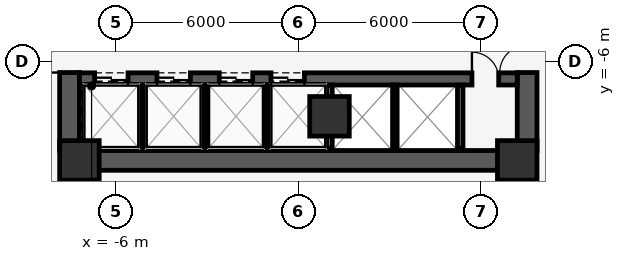
"""IFC4 building model, lengths in metres.
Left out: names, types, materials, properties, quantities, classifications, styles, units other than length and angle.
Written with IfcOpenShell. Run it as: python <this file> out.ifc"""

import sys

from ifc_helpers import new_model, si_unit, direction, frame, frame_2d, origin, origin_2d, place, context, subcontext, project, spatial, rectangle, extrude, element, fill, save


model = new_model("IFC4")
c1 = context("Model", 3, precision=1e-05, world=origin(), true_north=direction((0.0, 1.0)))
c2 = subcontext(c1, "Body", "Model", "MODEL_VIEW")
j1 = project(units=[si_unit("LENGTHUNIT", "METRE"), si_unit("PLANEANGLEUNIT", "RADIAN")], contexts=[c1])
p1 = place(None, origin())
s1 = spatial("IfcSite", under=j1, at=p1, CompositionType="ELEMENT")
p2 = place(p1, origin())
s2 = spatial("IfcBuilding", under=s1, at=p2, CompositionType="ELEMENT")
p3 = place(p2, frame((0.0, 0.0, 152.7)))
s3 = spatial("IfcBuildingStorey", under=s2, at=p3, CompositionType="ELEMENT", Elevation=152.7)
p4 = place(p3, frame((-7.525, -8.925, 0.0), z_axis=(0.0, 0.0, 1.0), x_axis=(0.0, 1.0, 0.0)))
e1 = element("IfcWall", 1, at=p4, inside=s3, PredefinedType="SHEAR", context=c2, shape_type="SweptSolid", body=[
    extrude(rectangle(XDim=9.025, YDim=0.65, at=frame_2d((4.513, 0.0))), origin(), (0.0, 0.0, 1.0), 3.85),
])
p5 = place(p4, frame((2.565, 0.0, 0.0)))
e2 = element("IfcOpeningElement", 2, at=p5, cuts=e1, PredefinedType="OPENING", context=c2, shape_type="SweptSolid", body=[
    extrude(rectangle(XDim=1.8, YDim=2.2, at=frame_2d((0.9, 1.1))), frame((0.0, 0.335, 0.0), z_axis=(0.0, -1.0, 0.0), x_axis=(1.0, 0.0, 0.0)), (0.0, 0.0, 1.0), 0.67),
])
p6 = place(p4, frame((7.475, 0.0, 0.0)))
e3 = element("IfcOpeningElement", 3, at=p6, cuts=e1, PredefinedType="OPENING", context=c2, shape_type="SweptSolid", body=[
    extrude(rectangle(XDim=1.2, YDim=2.15, at=frame_2d((0.6, 1.075))), frame((0.0, 0.335, 0.0), z_axis=(0.0, -1.0, 0.0), x_axis=(1.0, 0.0, 0.0)), (0.0, 0.0, 1.0), 0.67),
])
p7 = place(p3, frame((7.525, -8.925, 0.0), z_axis=(0.0, 0.0, 1.0), x_axis=(0.0, 1.0, 0.0)))
e4 = element("IfcWall", 4, at=p7, inside=s3, PredefinedType="SHEAR", context=c2, shape_type="SweptSolid", body=[
    extrude(rectangle(XDim=9.025, YDim=0.65, at=frame_2d((4.513, 0.0))), origin(), (0.0, 0.0, 1.0), 3.85),
])
p8 = place(p7, frame((2.565, 0.0, 0.0)))
e5 = element("IfcOpeningElement", 5, at=p8, cuts=e4, PredefinedType="OPENING", context=c2, shape_type="SweptSolid", body=[
    extrude(rectangle(XDim=1.8, YDim=2.2, at=frame_2d((0.9, 1.1))), frame((0.0, 0.335, 0.0), z_axis=(0.0, -1.0, 0.0), x_axis=(1.0, 0.0, 0.0)), (0.0, 0.0, 1.0), 0.67),
])
p9 = place(p7, frame((7.475, 0.0, 0.0)))
e6 = element("IfcOpeningElement", 6, at=p9, cuts=e4, PredefinedType="OPENING", context=c2, shape_type="SweptSolid", body=[
    extrude(rectangle(XDim=1.2, YDim=2.15, at=frame_2d((0.6, 1.075))), frame((0.0, 0.335, 0.0), z_axis=(0.0, -1.0, 0.0), x_axis=(1.0, 0.0, 0.0)), (0.0, 0.0, 1.0), 0.67),
])
p10 = place(p3, frame((-7.525, -9.25, 0.0), z_axis=(0.0, 0.0, 1.0), x_axis=(1.0, 0.0, 0.0)))
e7 = element("IfcWall", 7, at=p10, inside=s3, PredefinedType="SHEAR", context=c2, shape_type="SweptSolid", body=[
    extrude(rectangle(XDim=15.05, YDim=0.65, at=frame_2d((7.525, 0.0))), origin(), (0.0, 0.0, 1.0), 3.85),
])
p11 = place(p3, frame((-7.2, -6.57, 0.0), z_axis=(0.0, 0.0, 1.0), x_axis=(1.0, 0.0, 0.0)))
e8 = element("IfcWall", 8, at=p11, inside=s3, PredefinedType="SHEAR", context=c2, shape_type="SweptSolid", body=[
    extrude(rectangle(XDim=14.4, YDim=0.4, at=frame_2d((7.2, 0.0))), origin(), (0.0, 0.0, 1.0), 3.85),
])
p12 = place(p11, frame((0.5, 0.0, 0.0)))
e9 = element("IfcOpeningElement", 9, at=p12, cuts=e8, PredefinedType="OPENING", context=c2, shape_type="SweptSolid", body=[
    extrude(rectangle(XDim=1.1, YDim=2.2, at=frame_2d((0.55, 1.1))), frame((0.0, 0.21, 0.0), z_axis=(0.0, -1.0, 0.0), x_axis=(1.0, 0.0, 0.0)), (0.0, 0.0, 1.0), 0.42),
])
p13 = place(p11, frame((2.55, 0.0, 0.0)))
e10 = element("IfcOpeningElement", 10, at=p13, cuts=e8, PredefinedType="OPENING", context=c2, shape_type="SweptSolid", body=[
    extrude(rectangle(XDim=1.1, YDim=2.2, at=frame_2d((0.55, 1.1))), frame((0.0, 0.21, 0.0), z_axis=(0.0, -1.0, 0.0), x_axis=(1.0, 0.0, 0.0)), (0.0, 0.0, 1.0), 0.42),
])
p14 = place(p11, frame((4.6, 0.0, 0.0)))
e11 = element("IfcOpeningElement", 11, at=p14, cuts=e8, PredefinedType="OPENING", context=c2, shape_type="SweptSolid", body=[
    extrude(rectangle(XDim=1.1, YDim=2.2, at=frame_2d((0.55, 1.1))), frame((0.0, 0.21, 0.0), z_axis=(0.0, -1.0, 0.0), x_axis=(1.0, 0.0, 0.0)), (0.0, 0.0, 1.0), 0.42),
])
p15 = place(p11, frame((6.3, 0.0, 0.0)))
e12 = element("IfcOpeningElement", 12, at=p15, cuts=e8, PredefinedType="OPENING", context=c2, shape_type="SweptSolid", body=[
    extrude(rectangle(XDim=1.1, YDim=2.2, at=frame_2d((0.55, 1.1))), frame((0.0, 0.21, 0.0), z_axis=(0.0, -1.0, 0.0), x_axis=(1.0, 0.0, 0.0)), (0.0, 0.0, 1.0), 0.42),
])
p16 = place(p11, frame((12.91, 0.0, 0.0)))
e13 = element("IfcOpeningElement", 13, at=p16, cuts=e8, PredefinedType="OPENING", context=c2, shape_type="SweptSolid", body=[
    extrude(rectangle(XDim=0.88, YDim=2.15, at=frame_2d((0.44, 1.075))), frame((0.0, 0.21, 0.0), z_axis=(0.0, -1.0, 0.0), x_axis=(1.0, 0.0, 0.0)), (0.0, 0.0, 1.0), 0.42),
])
for number, where, z_axis, x_axis in (
    (14, (-7.2, -9.25, 0.0), (0.0, 0.0, 1.0), (1.0, 0.0, 0.0)),
    (15, (7.2, -9.25, 0.0), (0.0, 0.0, 1.0), (1.0, 0.0, 0.0)),
    (16, (1.025, -7.8, 0.0), (0.0, 0.0, 1.0), (1.0, 0.0, 0.0)),
):
    element("IfcColumn", number, at=place(p3, frame(where, z_axis=z_axis, x_axis=x_axis)), inside=s3, PredefinedType="COLUMN", context=c2, shape_type="SweptSolid", body=[
        extrude(rectangle(XDim=1.3, YDim=1.3, at=origin_2d()), origin(), (0.0, 0.0, 1.0), 4.1),
    ])
p17 = place(p3, frame((35.296, -9.873, 0.0), z_axis=(0.0, 0.0, 1.0), x_axis=(-0.933580612554, -0.35836746485, 0.0)))
e17 = element("IfcWall", 17, at=p17, inside=s3, PredefinedType="STANDARD", context=c2, shape_type="SweptSolid", body=[
    extrude(rectangle(XDim=58.828, YDim=0.3, at=frame_2d((29.414, 0.0))), origin(), (0.0, 0.0, 1.0), 3.85),
])
p18 = place(p17, frame((6.314, 0.0, 0.85)))
e18 = element("IfcOpeningElement", 18, at=p18, cuts=e17, PredefinedType="OPENING", context=c2, shape_type="SweptSolid", body=[
    extrude(rectangle(XDim=1.4, YDim=2.2, at=frame_2d((0.7, 1.1))), frame((0.0, 0.16, 0.0), z_axis=(0.0, -1.0, 0.0), x_axis=(1.0, 0.0, 0.0)), (0.0, 0.0, 1.0), 0.32),
])
p19 = place(p17, frame((11.914, 0.0, 0.85)))
e19 = element("IfcOpeningElement", 19, at=p19, cuts=e17, PredefinedType="OPENING", context=c2, shape_type="SweptSolid", body=[
    extrude(rectangle(XDim=1.4, YDim=2.2, at=frame_2d((0.7, 1.1))), frame((0.0, 0.16, 0.0), z_axis=(0.0, -1.0, 0.0), x_axis=(1.0, 0.0, 0.0)), (0.0, 0.0, 1.0), 0.32),
])
p20 = place(p17, frame((23.114, 0.0, 0.85)))
e20 = element("IfcOpeningElement", 20, at=p20, cuts=e17, PredefinedType="OPENING", context=c2, shape_type="SweptSolid", body=[
    extrude(rectangle(XDim=1.4, YDim=2.2, at=frame_2d((0.7, 1.1))), frame((0.0, 0.16, 0.0), z_axis=(0.0, -1.0, 0.0), x_axis=(1.0, 0.0, 0.0)), (0.0, 0.0, 1.0), 0.32),
])
p21 = place(p17, frame((28.714, 0.0, 0.85)))
e21 = element("IfcOpeningElement", 21, at=p21, cuts=e17, PredefinedType="OPENING", context=c2, shape_type="SweptSolid", body=[
    extrude(rectangle(XDim=1.4, YDim=2.2, at=frame_2d((0.7, 1.1))), frame((0.0, 0.16, 0.0), z_axis=(0.0, -1.0, 0.0), x_axis=(1.0, 0.0, 0.0)), (0.0, 0.0, 1.0), 0.32),
])
p22 = place(p17, frame((34.314, 0.0, 0.85)))
e22 = element("IfcOpeningElement", 22, at=p22, cuts=e17, PredefinedType="OPENING", context=c2, shape_type="SweptSolid", body=[
    extrude(rectangle(XDim=1.4, YDim=2.2, at=frame_2d((0.7, 1.1))), frame((0.0, 0.16, 0.0), z_axis=(0.0, -1.0, 0.0), x_axis=(1.0, 0.0, 0.0)), (0.0, 0.0, 1.0), 0.32),
])
p23 = place(p17, frame((45.514, 0.0, 0.85)))
e23 = element("IfcOpeningElement", 23, at=p23, cuts=e17, PredefinedType="OPENING", context=c2, shape_type="SweptSolid", body=[
    extrude(rectangle(XDim=1.4, YDim=2.2, at=frame_2d((0.7, 1.1))), frame((0.0, 0.16, 0.0), z_axis=(0.0, -1.0, 0.0), x_axis=(1.0, 0.0, 0.0)), (0.0, 0.0, 1.0), 0.32),
])
p24 = place(p17, frame((51.114, 0.0, 0.85)))
e24 = element("IfcOpeningElement", 24, at=p24, cuts=e17, PredefinedType="OPENING", context=c2, shape_type="SweptSolid", body=[
    extrude(rectangle(XDim=1.4, YDim=2.2, at=frame_2d((0.7, 1.1))), frame((0.0, 0.16, 0.0), z_axis=(0.0, -1.0, 0.0), x_axis=(1.0, 0.0, 0.0)), (0.0, 0.0, 1.0), 0.32),
])
for number, where, z_axis, x_axis in (
    (25, (-5.125, -8.85, 0.0), (0.0, 0.0, 1.0), (0.0, 1.0, 0.0)),
    (26, (-3.075, -8.85, 0.0), (0.0, 0.0, 1.0), (0.0, 1.0, 0.0)),
    (27, (-1.025, -8.85, 0.0), (0.0, 0.0, 1.0), (0.0, 1.0, 0.0)),
):
    element("IfcWall", number, at=place(p3, frame(where, z_axis=z_axis, x_axis=x_axis)), inside=s3, PredefinedType="PARTITIONING", context=c2, shape_type="SweptSolid", body=[
        extrude(rectangle(XDim=2.08, YDim=0.15, at=frame_2d((1.04, 0.0))), origin(), (0.0, 0.0, 1.0), 3.85),
    ])
p25 = place(p3, frame((1.025, -8.85, 0.0), z_axis=(0.0, 0.0, 1.0), x_axis=(0.0, 1.0, 0.0)))
e28 = element("IfcWall", 28, at=p25, inside=s3, PredefinedType="PARTITIONING", context=c2, shape_type="SweptSolid", body=[
    extrude(rectangle(XDim=2.08, YDim=0.18, at=frame_2d((1.04, 0.0))), origin(), (0.0, 0.0, 1.0), 2.898),
])
p26 = place(p3, frame((3.175, -8.85, 0.0), z_axis=(0.0, 0.0, 1.0), x_axis=(0.0, 1.0, 0.0)))
e29 = element("IfcWall", 29, at=p26, inside=s3, PredefinedType="PARTITIONING", context=c2, shape_type="SweptSolid", body=[
    extrude(rectangle(XDim=2.08, YDim=0.15, at=frame_2d((1.04, 0.0))), origin(), (0.0, 0.0, 1.0), 3.85),
])
p27 = place(p3, frame((5.325, -8.85, 0.0), z_axis=(0.0, 0.0, 1.0), x_axis=(0.0, 1.0, 0.0)))
e30 = element("IfcWall", 30, at=p27, inside=s3, PredefinedType="PARTITIONING", context=c2, shape_type="SweptSolid", body=[
    extrude(rectangle(XDim=2.08, YDim=0.18, at=frame_2d((1.04, 0.0))), origin(), (0.0, 0.0, 1.0), 3.85),
])
p28 = place(p12, origin())
e31 = element("IfcDoor", 31, at=p28, inside=s3, OperationType="DOUBLE_DOOR_SLIDING", PredefinedType="DOOR", context=c2, shape_type="SweptSolid", body=[
    extrude(rectangle(XDim=1.1, YDim=2.2, at=frame_2d((0.55, 1.1))), frame((0.0, 0.025, 0.0), z_axis=(0.0, -1.0, 0.0), x_axis=(1.0, 0.0, 0.0)), (0.0, 0.0, 1.0), 0.05),
])
fill(e9, e31)
p29 = place(p13, origin())
e32 = element("IfcDoor", 32, at=p29, inside=s3, OperationType="DOUBLE_DOOR_SLIDING", PredefinedType="DOOR", context=c2, shape_type="SweptSolid", body=[
    extrude(rectangle(XDim=1.1, YDim=2.2, at=frame_2d((0.55, 1.1))), frame((0.0, 0.025, 0.0), z_axis=(0.0, -1.0, 0.0), x_axis=(1.0, 0.0, 0.0)), (0.0, 0.0, 1.0), 0.05),
])
fill(e10, e32)
p30 = place(p14, origin())
e33 = element("IfcDoor", 33, at=p30, inside=s3, OperationType="DOUBLE_DOOR_SLIDING", PredefinedType="DOOR", context=c2, shape_type="SweptSolid", body=[
    extrude(rectangle(XDim=1.1, YDim=2.2, at=frame_2d((0.55, 1.1))), frame((0.0, 0.025, 0.0), z_axis=(0.0, -1.0, 0.0), x_axis=(1.0, 0.0, 0.0)), (0.0, 0.0, 1.0), 0.05),
])
fill(e11, e33)
p31 = place(p15, origin())
e34 = element("IfcDoor", 34, at=p31, inside=s3, OperationType="DOUBLE_DOOR_SLIDING", PredefinedType="DOOR", context=c2, shape_type="SweptSolid", body=[
    extrude(rectangle(XDim=1.1, YDim=2.2, at=frame_2d((0.55, 1.1))), frame((0.0, 0.025, 0.0), z_axis=(0.0, -1.0, 0.0), x_axis=(1.0, 0.0, 0.0)), (0.0, 0.0, 1.0), 0.05),
])
fill(e12, e34)
p32 = place(p5, origin())
e35 = element("IfcDoor", 35, at=p32, inside=s3, OperationType="DOUBLE_DOOR_SINGLE_SWING", PredefinedType="DOOR", context=c2, shape_type="SweptSolid", body=[
    extrude(rectangle(XDim=1.8, YDim=2.2, at=frame_2d((0.9, 1.1))), frame((0.0, 0.025, 0.0), z_axis=(0.0, -1.0, 0.0), x_axis=(1.0, 0.0, 0.0)), (0.0, 0.0, 1.0), 0.05),
])
fill(e2, e35)
p33 = place(p8, origin())
e36 = element("IfcDoor", 36, at=p33, inside=s3, OperationType="DOUBLE_DOOR_SINGLE_SWING", PredefinedType="DOOR", context=c2, shape_type="SweptSolid", body=[
    extrude(rectangle(XDim=1.8, YDim=2.2, at=frame_2d((0.9, 1.1))), frame((0.0, 0.025, 0.0), z_axis=(0.0, -1.0, 0.0), x_axis=(1.0, 0.0, 0.0)), (0.0, 0.0, 1.0), 0.05),
])
fill(e5, e36)
p34 = place(p16, origin())
e37 = element("IfcDoor", 37, at=p34, inside=s3, OperationType="SINGLE_SWING_LEFT", PredefinedType="DOOR", context=c2, shape_type="SweptSolid", body=[
    extrude(rectangle(XDim=0.88, YDim=2.15, at=frame_2d((0.44, 1.075))), frame((0.0, 0.025, 0.0), z_axis=(0.0, -1.0, 0.0), x_axis=(1.0, 0.0, 0.0)), (0.0, 0.0, 1.0), 0.05),
])
fill(e13, e37)
save(model, sys.argv[1])
